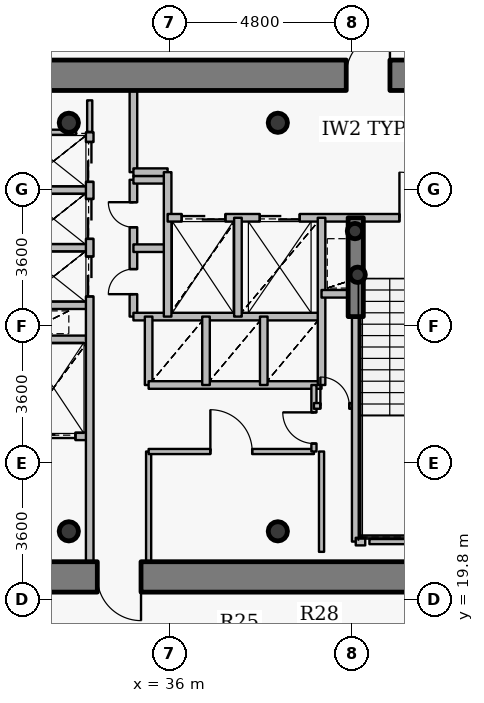
"""IFC4 building model, lengths in metres.
Left out: names, types, materials, properties, quantities, classifications, styles, units other than length and angle.
Written with IfcOpenShell. Run it as: python <this file> out.ifc"""

import sys

from ifc_helpers import new_model, si_unit, direction, frame, frame_2d, origin, origin_2d, place, context, subcontext, project, spatial, rectangle, hollow_circle, extrude, source, transform, mapped, element, fill, save


model = new_model("IFC4")
c1 = context("Model", 3, precision=1e-05, world=origin(), true_north=direction((0.0, 1.0)))
c2 = subcontext(c1, "Body", "Model", "MODEL_VIEW")
j1 = project(units=[si_unit("LENGTHUNIT", "METRE"), si_unit("PLANEANGLEUNIT", "RADIAN")], contexts=[c1])
p1 = place(None, origin())
s1 = spatial("IfcSite", under=j1, at=p1, CompositionType="ELEMENT")
p2 = place(p1, origin())
s2 = spatial("IfcBuilding", under=s1, at=p2, CompositionType="ELEMENT")
p3 = place(p2, frame((0.0, 0.0, 182.4)))
s3 = spatial("IfcBuildingStorey", under=s2, at=p3, CompositionType="ELEMENT", Elevation=182.4)
for number, where, z_axis, x_axis in (
    (1, (33.35, 21.6, 0.0), (0.0, 0.0, 1.0), (1.0, 0.0, 0.0)),
    (2, (38.85, 21.6, 0.0), (0.0, 0.0, 1.0), (1.0, 0.0, 0.0)),
    (3, (38.85, 32.35, 0.0), (0.0, 0.0, 1.0), (1.0, 0.0, 0.0)),
    (4, (33.35, 32.35, 0.0), (0.0, 0.0, 1.0), (1.0, 0.0, 0.0)),
):
    element("IfcColumn", number, at=place(p3, frame(where, z_axis=z_axis, x_axis=x_axis)), inside=s3, PredefinedType="COLUMN", context=c2, shape_type="SweptSolid", body=[
        extrude(hollow_circle(Radius=0.254, WallThickness=0.02, at=origin_2d()), origin(), (0.0, 0.0, 1.0), 3.75),
    ])
for number, where, z_axis, x_axis in (
    (5, (40.95, 28.35, 0.0), (0.0, 0.0, 1.0), (1.0, 0.0, 0.0)),
    (6, (40.88, 29.5, 0.0), (0.0, 0.0, 1.0), (1.0, 0.0, 0.0)),
):
    element("IfcColumn", number, at=place(p3, frame(where, z_axis=z_axis, x_axis=x_axis)), inside=s3, PredefinedType="COLUMN", context=c2, shape_type="SweptSolid", body=[
        extrude(hollow_circle(Radius=0.203, WallThickness=0.016, at=origin_2d()), origin(), (0.0, 0.0, 1.0), 3.75),
    ])
p4 = place(p3, frame((27.2, 33.6, 0.0), z_axis=(0.0, 0.0, 1.0), x_axis=(1.0, 0.0, 0.0)))
e7 = element("IfcWall", 7, at=p4, inside=s3, PredefinedType="SHEAR", context=c2, shape_type="SweptSolid", body=[
    extrude(rectangle(XDim=17.6, YDim=0.8, at=frame_2d((8.8, 0.0))), origin(), (0.0, 0.0, 1.0), 2.95),
])
p5 = place(p4, frame((13.45, 0.0, 0.0)))
e8 = element("IfcOpeningElement", 8, at=p5, cuts=e7, PredefinedType="OPENING", context=c2, shape_type="SweptSolid", body=[
    extrude(rectangle(XDim=1.15, YDim=2.15, at=origin_2d()), frame((0.575, 0.41, 1.075), z_axis=(0.0, -1.0, 0.0), x_axis=(1.0, 0.0, 0.0)), (0.0, 0.0, 1.0), 0.82),
])
p6 = place(p3, frame((44.8, 20.4, 0.0), z_axis=(0.0, 0.0, 1.0), x_axis=(-1.0, 0.0, 0.0)))
e9 = element("IfcWall", 9, at=p6, inside=s3, PredefinedType="SHEAR", context=c2, shape_type="SweptSolid", body=[
    extrude(rectangle(XDim=17.6, YDim=0.8, at=frame_2d((8.8, 0.0))), origin(), (0.0, 0.0, 1.0), 2.95),
])
p7 = place(p6, frame((9.55, 0.0, 0.0)))
e10 = element("IfcOpeningElement", 10, at=p7, cuts=e9, PredefinedType="OPENING", context=c2, shape_type="SweptSolid", body=[
    extrude(rectangle(XDim=1.15, YDim=2.15, at=origin_2d()), frame((0.575, 0.41, 1.075), z_axis=(0.0, -1.0, 0.0), x_axis=(1.0, 0.0, 0.0)), (0.0, 0.0, 1.0), 0.82),
])
p8 = place(p3, frame((40.9, 27.25, 0.0), z_axis=(0.0, 0.0, 1.0), x_axis=(0.0, 1.0, 0.0)))
e11 = element("IfcWall", 11, at=p8, inside=s3, PredefinedType="SHEAR", context=c2, shape_type="SweptSolid", body=[
    extrude(rectangle(XDim=2.6, YDim=0.4, at=frame_2d((1.3, 0.0))), origin(), (0.0, 0.0, 1.0), 3.1),
])
p9 = place(p3, frame((32.0, 24.1, 0.0), z_axis=(0.0, 0.0, 1.0), x_axis=(1.0, 0.0, 0.0)))
e12 = element("IfcWall", 12, at=p9, inside=s3, PredefinedType="PARTITIONING", context=c2, shape_type="SweptSolid", body=[
    extrude(rectangle(XDim=1.9, YDim=0.2, at=frame_2d((0.95, 0.0))), origin(), (0.0, 0.0, 1.0), 3.085),
])
p10 = place(p9, frame((0.375, 0.0, 0.0)))
e13 = element("IfcOpeningElement", 13, at=p10, cuts=e12, PredefinedType="OPENING", context=c2, shape_type="SweptSolid", body=[
    extrude(rectangle(XDim=1.15, YDim=2.15, at=origin_2d()), frame((0.575, 0.11, 1.075), z_axis=(0.0, -1.0, 0.0), x_axis=(1.0, 0.0, 0.0)), (0.0, 0.0, 1.0), 0.22),
])
for number, where, z_axis, x_axis in (
    (14, (32.0, 26.65, 0.0), (0.0, 0.0, 1.0), (1.0, 0.0, 0.0)),
    (15, (32.0, 27.55, 0.0), (0.0, 0.0, 1.0), (1.0, 0.0, 0.0)),
    (16, (32.0, 29.06, 0.0), (0.0, 0.0, 1.0), (1.0, 0.0, 0.0)),
    (17, (32.0, 30.58, 0.0), (0.0, 0.0, 1.0), (1.0, 0.0, 0.0)),
):
    element("IfcWall", number, at=place(p3, frame(where, z_axis=z_axis, x_axis=x_axis)), inside=s3, PredefinedType="PARTITIONING", context=c2, shape_type="SweptSolid", body=[
        extrude(rectangle(XDim=1.9, YDim=0.2, at=frame_2d((0.95, 0.0))), origin(), (0.0, 0.0, 1.0), 3.085),
    ])
p11 = place(p3, frame((33.9, 20.8, 0.0), z_axis=(0.0, 0.0, 1.0), x_axis=(0.0, 1.0, 0.0)))
e18 = element("IfcWall", 18, at=p11, inside=s3, PredefinedType="PARTITIONING", context=c2, shape_type="SweptSolid", body=[
    extrude(rectangle(XDim=11.3, YDim=0.2, at=frame_2d((5.65, 0.0))), origin(), (0.0, 0.0, 1.0), 3.085),
])
p12 = place(p11, frame((6.98, 0.0, 0.0)))
e19 = element("IfcOpeningElement", 19, at=p12, cuts=e18, PredefinedType="OPENING", context=c2, shape_type="SweptSolid", body=[
    extrude(rectangle(XDim=1.05, YDim=2.15, at=origin_2d()), frame((0.525, 0.11, 1.075), z_axis=(0.0, -1.0, 0.0), x_axis=(1.0, 0.0, 0.0)), (0.0, 0.0, 1.0), 0.22),
])
p13 = place(p11, frame((8.495, 0.0, 0.0)))
e20 = element("IfcOpeningElement", 20, at=p13, cuts=e18, PredefinedType="OPENING", context=c2, shape_type="SweptSolid", body=[
    extrude(rectangle(XDim=1.05, YDim=2.15, at=origin_2d()), frame((0.525, 0.11, 1.075), z_axis=(0.0, -1.0, 0.0), x_axis=(1.0, 0.0, 0.0)), (0.0, 0.0, 1.0), 0.22),
])
p14 = place(p11, frame((9.995, 0.0, 0.0)))
e21 = element("IfcOpeningElement", 21, at=p14, cuts=e18, PredefinedType="OPENING", context=c2, shape_type="SweptSolid", body=[
    extrude(rectangle(XDim=1.05, YDim=2.15, at=origin_2d()), frame((0.525, 0.11, 1.075), z_axis=(0.0, -1.0, 0.0), x_axis=(1.0, 0.0, 0.0)), (0.0, 0.0, 1.0), 0.22),
])
p15 = place(p3, frame((35.05, 27.25, 0.0), z_axis=(0.0, 0.0, 1.0), x_axis=(0.0, 1.0, 0.0)))
e22 = element("IfcWall", 22, at=p15, inside=s3, PredefinedType="PARTITIONING", context=c2, shape_type="SweptSolid", body=[
    extrude(rectangle(XDim=3.6, YDim=0.2, at=frame_2d((1.8, 0.0))), origin(), (0.0, 0.0, 1.0), 3.5),
])
p16 = place(p15, frame((0.59, 0.0, 0.0)))
e23 = element("IfcOpeningElement", 23, at=p16, cuts=e22, PredefinedType="OPENING", context=c2, shape_type="SweptSolid", body=[
    extrude(rectangle(XDim=0.66, YDim=2.05, at=origin_2d()), frame((0.33, 0.11, 1.025), z_axis=(0.0, -1.0, 0.0), x_axis=(1.0, 0.0, 0.0)), (0.0, 0.0, 1.0), 0.22),
])
p17 = place(p15, frame((2.35, 0.0, 0.0)))
e24 = element("IfcOpeningElement", 24, at=p17, cuts=e22, PredefinedType="OPENING", context=c2, shape_type="SweptSolid", body=[
    extrude(rectangle(XDim=0.66, YDim=2.05, at=origin_2d()), frame((0.33, 0.11, 1.025), z_axis=(0.0, -1.0, 0.0), x_axis=(1.0, 0.0, 0.0)), (0.0, 0.0, 1.0), 0.22),
])
p18 = place(p3, frame((35.05, 27.25, 0.0), z_axis=(0.0, 0.0, 1.0), x_axis=(1.0, 0.0, 0.0)))
e25 = element("IfcWall", 25, at=p18, inside=s3, PredefinedType="PARTITIONING", context=c2, shape_type="SweptSolid", body=[
    extrude(rectangle(XDim=4.95, YDim=0.2, at=frame_2d((2.475, 0.0))), origin(), (0.0, 0.0, 1.0), 3.085),
])
for number, where, z_axis, x_axis in (
    (26, (35.05, 29.05, 0.0), (0.0, 0.0, 1.0), (1.0, 0.0, 0.0)),
    (27, (35.05, 30.85, 0.0), (0.0, 0.0, 1.0), (1.0, 0.0, 0.0)),
):
    element("IfcWall", number, at=place(p3, frame(where, z_axis=z_axis, x_axis=x_axis)), inside=s3, PredefinedType="PARTITIONING", context=c2, shape_type="SweptSolid", body=[
        extrude(rectangle(XDim=0.9, YDim=0.2, at=frame_2d((0.45, 0.0))), origin(), (0.0, 0.0, 1.0), 3.5),
    ])
p19 = place(p3, frame((35.05, 31.05, 0.0), z_axis=(0.0, 0.0, 1.0), x_axis=(0.0, 1.0, 0.0)))
e28 = element("IfcWall", 28, at=p19, inside=s3, PredefinedType="PARTITIONING", context=c2, shape_type="SweptSolid", body=[
    extrude(rectangle(XDim=2.15, YDim=0.2, at=frame_2d((1.075, 0.0))), origin(), (0.0, 0.0, 1.0), 3.085),
])
p20 = place(p3, frame((35.05, 31.05, 0.0), z_axis=(0.0, 0.0, 1.0), x_axis=(1.0, 0.0, 0.0)))
e29 = element("IfcWall", 29, at=p20, inside=s3, PredefinedType="PARTITIONING", context=c2, shape_type="SweptSolid", body=[
    extrude(rectangle(XDim=0.9, YDim=0.2, at=frame_2d((0.45, 0.0))), origin(), (0.0, 0.0, 1.0), 3.5),
])
p21 = place(p3, frame((35.45, 20.8, 0.0), z_axis=(0.0, 0.0, 1.0), x_axis=(0.0, 1.0, 0.0)))
e30 = element("IfcWall", 30, at=p21, inside=s3, PredefinedType="PARTITIONING", context=c2, shape_type="SweptSolid", body=[
    extrude(rectangle(XDim=2.9, YDim=0.135, at=frame_2d((1.45, 0.0))), origin(), (0.0, 0.0, 1.0), 3.085),
])
p22 = place(p3, frame((35.45, 23.7, 0.0), z_axis=(0.0, 0.0, 1.0), x_axis=(1.0, 0.0, 0.0)))
e31 = element("IfcWall", 31, at=p22, inside=s3, PredefinedType="PARTITIONING", context=c2, shape_type="SweptSolid", body=[
    extrude(rectangle(XDim=4.35, YDim=0.135, at=frame_2d((2.175, 0.0))), origin(), (0.0, 0.0, 1.0), 3.085),
])
p23 = place(p22, frame((1.625, 0.0, 0.0)))
e32 = element("IfcOpeningElement", 32, at=p23, cuts=e31, PredefinedType="OPENING", context=c2, shape_type="SweptSolid", body=[
    extrude(rectangle(XDim=1.1, YDim=2.15, at=origin_2d()), frame((0.55, 0.078, 1.075), z_axis=(0.0, -1.0, 0.0), x_axis=(1.0, 0.0, 0.0)), (0.0, 0.0, 1.0), 0.155),
])
p24 = place(p3, frame((35.45, 25.45, 0.0), z_axis=(0.0, 0.0, 1.0), x_axis=(0.0, 1.0, 0.0)))
e33 = element("IfcWall", 33, at=p24, inside=s3, PredefinedType="PARTITIONING", context=c2, shape_type="SweptSolid", body=[
    extrude(rectangle(XDim=1.8, YDim=0.2, at=frame_2d((0.9, 0.0))), origin(), (0.0, 0.0, 1.0), 3.5),
])
p25 = place(p3, frame((35.45, 25.45, 0.0), z_axis=(0.0, 0.0, 1.0), x_axis=(1.0, 0.0, 0.0)))
e34 = element("IfcWall", 34, at=p25, inside=s3, PredefinedType="PARTITIONING", context=c2, shape_type="SweptSolid", body=[
    extrude(rectangle(XDim=4.55, YDim=0.2, at=frame_2d((2.275, 0.0))), origin(), (0.0, 0.0, 1.0), 3.085),
])
p26 = place(p3, frame((35.95, 27.25, 0.0), z_axis=(0.0, 0.0, 1.0), x_axis=(0.0, 1.0, 0.0)))
e35 = element("IfcWall", 35, at=p26, inside=s3, PredefinedType="PARTITIONING", context=c2, shape_type="SweptSolid", body=[
    extrude(rectangle(XDim=3.8, YDim=0.2, at=frame_2d((1.9, 0.0))), origin(), (0.0, 0.0, 1.0), 3.5),
])
p27 = place(p3, frame((35.95, 29.85, 0.0), z_axis=(0.0, 0.0, 1.0), x_axis=(1.0, 0.0, 0.0)))
e36 = element("IfcWall", 36, at=p27, inside=s3, PredefinedType="PARTITIONING", context=c2, shape_type="SweptSolid", body=[
    extrude(rectangle(XDim=8.49, YDim=0.2, at=frame_2d((4.245, 0.0))), origin(), (0.0, 0.0, 1.0), 3.085),
])
p28 = place(p27, frame((6.1, 0.0, 0.0)))
e37 = element("IfcOpeningElement", 37, at=p28, cuts=e36, PredefinedType="OPENING", context=c2, shape_type="SweptSolid", body=[
    extrude(rectangle(XDim=1.2, YDim=2.15, at=origin_2d()), frame((0.6, 0.11, 1.075), z_axis=(0.0, -1.0, 0.0), x_axis=(1.0, 0.0, 0.0)), (0.0, 0.0, 1.0), 0.22),
])
p29 = place(p27, frame((0.37, 0.0, 0.0)))
e38 = element("IfcOpeningElement", 38, at=p29, cuts=e36, PredefinedType="OPENING", context=c2, shape_type="SweptSolid", body=[
    extrude(rectangle(XDim=1.15, YDim=2.15, at=origin_2d()), frame((0.575, 0.11, 1.075), z_axis=(0.0, -1.0, 0.0), x_axis=(1.0, 0.0, 0.0)), (0.0, 0.0, 1.0), 0.22),
])
p30 = place(p27, frame((2.425, 0.0, 0.0)))
e39 = element("IfcOpeningElement", 39, at=p30, cuts=e36, PredefinedType="OPENING", context=c2, shape_type="SweptSolid", body=[
    extrude(rectangle(XDim=1.05, YDim=2.15, at=origin_2d()), frame((0.525, 0.11, 1.075), z_axis=(0.0, -1.0, 0.0), x_axis=(1.0, 0.0, 0.0)), (0.0, 0.0, 1.0), 0.22),
])
p31 = place(p3, frame((36.96, 25.45, 0.0), z_axis=(0.0, 0.0, 1.0), x_axis=(0.0, 1.0, 0.0)))
e40 = element("IfcWall", 40, at=p31, inside=s3, PredefinedType="PARTITIONING", context=c2, shape_type="SweptSolid", body=[
    extrude(rectangle(XDim=1.8, YDim=0.2, at=frame_2d((0.9, 0.0))), origin(), (0.0, 0.0, 1.0), 3.5),
])
p32 = place(p3, frame((37.8, 27.25, 0.0), z_axis=(0.0, 0.0, 1.0), x_axis=(0.0, 1.0, 0.0)))
e41 = element("IfcWall", 41, at=p32, inside=s3, PredefinedType="PARTITIONING", context=c2, shape_type="SweptSolid", body=[
    extrude(rectangle(XDim=2.6, YDim=0.2, at=frame_2d((1.3, 0.0))), origin(), (0.0, 0.0, 1.0), 3.5),
])
p33 = place(p3, frame((38.48, 25.45, 0.0), z_axis=(0.0, 0.0, 1.0), x_axis=(0.0, 1.0, 0.0)))
e42 = element("IfcWall", 42, at=p33, inside=s3, PredefinedType="PARTITIONING", context=c2, shape_type="SweptSolid", body=[
    extrude(rectangle(XDim=1.8, YDim=0.2, at=frame_2d((0.9, 0.0))), origin(), (0.0, 0.0, 1.0), 3.5),
])
p34 = place(p3, frame((39.8, 23.7, 0.0), z_axis=(0.0, 0.0, 1.0), x_axis=(0.0, 1.0, 0.0)))
e43 = element("IfcWall", 43, at=p34, inside=s3, PredefinedType="PARTITIONING", context=c2, shape_type="SweptSolid", body=[
    extrude(rectangle(XDim=1.75, YDim=0.135, at=frame_2d((0.875, 0.0))), origin(), (0.0, 0.0, 1.0), 3.5),
])
p35 = place(p34, frame((0.21, 0.0, 0.0)))
e44 = element("IfcOpeningElement", 44, at=p35, cuts=e43, PredefinedType="OPENING", context=c2, shape_type="SweptSolid", body=[
    extrude(rectangle(XDim=0.82, YDim=2.1, at=origin_2d()), frame((0.41, 0.078, 1.05), z_axis=(0.0, -1.0, 0.0), x_axis=(1.0, 0.0, 0.0)), (0.0, 0.0, 1.0), 0.155),
])
p36 = place(p3, frame((39.8, 24.9, 0.0), z_axis=(0.0, 0.0, 1.0), x_axis=(1.0, 0.0, 0.0)))
e45 = element("IfcWall", 45, at=p36, inside=s3, PredefinedType="PARTITIONING", context=c2, shape_type="SweptSolid", body=[
    extrude(rectangle(XDim=1.1, YDim=0.15, at=frame_2d((0.55, 0.0))), origin(), (0.0, 0.0, 1.0), 3.5),
])
p37 = place(p36, frame((0.17, 0.0, 0.0)))
e46 = element("IfcOpeningElement", 46, at=p37, cuts=e45, PredefinedType="OPENING", context=c2, shape_type="SweptSolid", body=[
    extrude(rectangle(XDim=0.76, YDim=2.1, at=origin_2d()), frame((0.38, 0.085, 1.05), z_axis=(0.0, -1.0, 0.0), x_axis=(1.0, 0.0, 0.0)), (0.0, 0.0, 1.0), 0.17),
])
p38 = place(p3, frame((40.0, 25.45, 0.0), z_axis=(0.0, 0.0, 1.0), x_axis=(0.0, 1.0, 0.0)))
e47 = element("IfcWall", 47, at=p38, inside=s3, PredefinedType="PARTITIONING", context=c2, shape_type="SweptSolid", body=[
    extrude(rectangle(XDim=4.4, YDim=0.2, at=frame_2d((2.2, 0.0))), origin(), (0.0, 0.0, 1.0), 3.5),
])
p39 = place(p3, frame((40.0, 27.85, 0.0), z_axis=(0.0, 0.0, 1.0), x_axis=(1.0, 0.0, 0.0)))
e48 = element("IfcWall", 48, at=p39, inside=s3, PredefinedType="PARTITIONING", context=c2, shape_type="SweptSolid", body=[
    extrude(rectangle(XDim=0.9, YDim=0.2, at=frame_2d((0.45, 0.0))), origin(), (0.0, 0.0, 1.0), 3.5),
])
p40 = place(p3, frame((40.9, 21.33, 0.0), z_axis=(0.0, 0.0, 1.0), x_axis=(0.0, 1.0, 0.0)))
e49 = element("IfcWall", 49, at=p40, inside=s3, PredefinedType="PARTITIONING", context=c2, shape_type="SweptSolid", body=[
    extrude(rectangle(XDim=5.91, YDim=0.2, at=frame_2d((2.955, 0.0))), origin(), (0.0, 0.0, 1.0), 3.035),
])
p41 = place(p3, frame((40.9, 21.33, 0.0), z_axis=(0.0, 0.0, 1.0), x_axis=(1.0, 0.0, 0.0)))
e50 = element("IfcWall", 50, at=p41, inside=s3, PredefinedType="PARTITIONING", context=c2, shape_type="SweptSolid", body=[
    extrude(rectangle(XDim=0.25, YDim=0.2, at=frame_2d((0.125, 0.0))), origin(), (0.0, 0.0, 1.0), 3.035),
])
p42 = place(p3, frame((44.08, 21.33, 0.0), z_axis=(0.0, 0.0, 1.0), x_axis=(-1.0, 0.0, 0.0)))
e51 = element("IfcWall", 51, at=p42, inside=s3, PredefinedType="PARTITIONING", context=c2, shape_type="SweptSolid", body=[
    extrude(rectangle(XDim=2.82, YDim=0.135, at=frame_2d((1.41, 0.0))), origin(), (0.0, 0.0, 1.0), 3.035),
])
p43 = place(p3, frame((32.36, 32.1, 0.0), z_axis=(0.0, 0.0, 1.0), x_axis=(1.0, 0.0, 0.0)))
e52 = element("IfcWall", 52, at=p43, inside=s3, PredefinedType="PARTITIONING", context=c2, shape_type="SweptSolid", body=[
    extrude(rectangle(XDim=1.18, YDim=0.135, at=frame_2d((0.59, 0.0))), origin(), (0.0, 0.0, 1.0), 3.085),
])
p44 = place(p3, frame((40.0, 23.7, 0.0), z_axis=(0.0, 0.0, 1.0), x_axis=(0.0, -1.0, 0.0)))
e53 = element("IfcWall", 53, at=p44, inside=s3, PredefinedType="PARTITIONING", context=c2, shape_type="SweptSolid", body=[
    extrude(rectangle(XDim=2.64, YDim=0.135, at=frame_2d((1.32, 0.0))), origin(), (0.0, 0.0, 1.0), 3.035),
])
p45 = place(p3, frame((33.9, 32.11, 0.0), z_axis=(0.0, 0.0, 1.0), x_axis=(0.0, 1.0, 0.0)))
e54 = element("IfcWall", 54, at=p45, inside=s3, PredefinedType="PARTITIONING", context=c2, shape_type="SweptSolid", body=[
    extrude(rectangle(XDim=0.83, YDim=0.135, at=frame_2d((0.415, 0.0))), origin(), (0.0, 0.0, 1.0), 3.085),
])
m1 = source(origin(), c2, "Body", "SweptSolid", [
    extrude(rectangle(XDim=1.15, YDim=2.15, at=origin_2d()), frame((0.575, 0.025, 1.075), z_axis=(0.0, -1.0, 0.0), x_axis=(1.0, 0.0, 0.0)), (0.0, 0.0, 1.0), 0.05),
])
p46 = place(p5, origin())
e55 = element("IfcDoor", 55, at=p46, inside=s3, OperationType="SINGLE_SWING_RIGHT", PredefinedType="DOOR", context=c2, shape_type="MappedRepresentation", body=[
    mapped(m1, transform((0.0, 0.0, 0.0), x_axis=(1.0, 0.0, 0.0), y_axis=(0.0, 1.0, 0.0), z_axis=(0.0, 0.0, 1.0), scale=1.0)),
])
fill(e8, e55)
p47 = place(p7, origin())
e56 = element("IfcDoor", 56, at=p47, inside=s3, OperationType="SINGLE_SWING_LEFT", PredefinedType="DOOR", context=c2, shape_type="MappedRepresentation", body=[
    mapped(m1, transform((0.0, 0.0, 0.0), x_axis=(1.0, 0.0, 0.0), y_axis=(0.0, 1.0, 0.0), z_axis=(0.0, 0.0, 1.0), scale=1.0)),
])
fill(e10, e56)
m2 = source(origin(), c2, "Body", "SweptSolid", [
    extrude(rectangle(XDim=1.2, YDim=2.15, at=origin_2d()), frame((0.6, 0.025, 1.075), z_axis=(0.0, -1.0, 0.0), x_axis=(1.0, 0.0, 0.0)), (0.0, 0.0, 1.0), 0.05),
])
p48 = place(p28, origin())
e57 = element("IfcDoor", 57, at=p48, inside=s3, OperationType="SINGLE_SWING_LEFT", PredefinedType="DOOR", context=c2, shape_type="MappedRepresentation", body=[
    mapped(m2, transform((0.0, 0.0, 0.0), x_axis=(1.0, 0.0, 0.0), y_axis=(0.0, 1.0, 0.0), z_axis=(0.0, 0.0, 1.0), scale=1.0)),
])
fill(e37, e57)
m3 = source(origin(), c2, "Body", "SweptSolid", [
    extrude(rectangle(XDim=1.15, YDim=2.15, at=origin_2d()), frame((0.575, 0.025, 1.075), z_axis=(0.0, -1.0, 0.0), x_axis=(1.0, 0.0, 0.0)), (0.0, 0.0, 1.0), 0.05),
])
p49 = place(p29, origin())
e58 = element("IfcDoor", 58, at=p49, inside=s3, OperationType="DOUBLE_DOOR_SLIDING", PredefinedType="USERDEFINED", context=c2, shape_type="MappedRepresentation", body=[
    mapped(m3, transform((0.0, 0.0, 0.0), x_axis=(1.0, 0.0, 0.0), y_axis=(0.0, 1.0, 0.0), z_axis=(0.0, 0.0, 1.0), scale=1.0)),
])
fill(e38, e58)
p50 = place(p10, origin())
e59 = element("IfcDoor", 59, at=p50, inside=s3, OperationType="DOUBLE_DOOR_SLIDING", PredefinedType="USERDEFINED", context=c2, shape_type="MappedRepresentation", body=[
    mapped(m3, transform((0.0, 0.0, 0.0), x_axis=(1.0, 0.0, 0.0), y_axis=(0.0, 1.0, 0.0), z_axis=(0.0, 0.0, 1.0), scale=1.0)),
])
fill(e13, e59)
m4 = source(origin(), c2, "Body", "SweptSolid", [
    extrude(rectangle(XDim=1.05, YDim=2.15, at=origin_2d()), frame((0.525, 0.025, 1.075), z_axis=(0.0, -1.0, 0.0), x_axis=(1.0, 0.0, 0.0)), (0.0, 0.0, 1.0), 0.05),
])
p51 = place(p30, origin())
e60 = element("IfcDoor", 60, at=p51, inside=s3, OperationType="DOUBLE_DOOR_SLIDING", PredefinedType="USERDEFINED", context=c2, shape_type="MappedRepresentation", body=[
    mapped(m4, transform((0.0, 0.0, 0.0), x_axis=(1.0, 0.0, 0.0), y_axis=(0.0, 1.0, 0.0), z_axis=(0.0, 0.0, 1.0), scale=1.0)),
])
fill(e39, e60)
p52 = place(p12, origin())
e61 = element("IfcDoor", 61, at=p52, inside=s3, OperationType="DOUBLE_DOOR_SLIDING", PredefinedType="USERDEFINED", context=c2, shape_type="MappedRepresentation", body=[
    mapped(m4, transform((0.0, 0.0, 0.0), x_axis=(1.0, 0.0, 0.0), y_axis=(0.0, 1.0, 0.0), z_axis=(0.0, 0.0, 1.0), scale=1.0)),
])
fill(e19, e61)
p53 = place(p13, origin())
e62 = element("IfcDoor", 62, at=p53, inside=s3, OperationType="DOUBLE_DOOR_SLIDING", PredefinedType="USERDEFINED", context=c2, shape_type="MappedRepresentation", body=[
    mapped(m4, transform((0.0, 0.0, 0.0), x_axis=(1.0, 0.0, 0.0), y_axis=(0.0, 1.0, 0.0), z_axis=(0.0, 0.0, 1.0), scale=1.0)),
])
fill(e20, e62)
p54 = place(p14, origin())
e63 = element("IfcDoor", 63, at=p54, inside=s3, OperationType="DOUBLE_DOOR_SLIDING", PredefinedType="USERDEFINED", context=c2, shape_type="MappedRepresentation", body=[
    mapped(m4, transform((0.0, 0.0, 0.0), x_axis=(1.0, 0.0, 0.0), y_axis=(0.0, 1.0, 0.0), z_axis=(0.0, 0.0, 1.0), scale=1.0)),
])
fill(e21, e63)
m5 = source(origin(), c2, "Body", "SweptSolid", [
    extrude(rectangle(XDim=0.66, YDim=2.05, at=origin_2d()), frame((0.33, 0.025, 1.025), z_axis=(0.0, -1.0, 0.0), x_axis=(1.0, 0.0, 0.0)), (0.0, 0.0, 1.0), 0.05),
])
p55 = place(p16, origin())
e64 = element("IfcDoor", 64, at=p55, inside=s3, OperationType="SINGLE_SWING_LEFT", PredefinedType="USERDEFINED", context=c2, shape_type="MappedRepresentation", body=[
    mapped(m5, transform((0.0, 0.0, 0.0), x_axis=(1.0, 0.0, 0.0), y_axis=(0.0, 1.0, 0.0), z_axis=(0.0, 0.0, 1.0), scale=1.0)),
])
fill(e23, e64)
p56 = place(p17, origin())
e65 = element("IfcDoor", 65, at=p56, inside=s3, OperationType="SINGLE_SWING_RIGHT", PredefinedType="USERDEFINED", context=c2, shape_type="MappedRepresentation", body=[
    mapped(m5, transform((0.0, 0.0, 0.0), x_axis=(1.0, 0.0, 0.0), y_axis=(0.0, 1.0, 0.0), z_axis=(0.0, 0.0, 1.0), scale=1.0)),
])
fill(e24, e65)
m6 = source(origin(), c2, "Body", "SweptSolid", [
    extrude(rectangle(XDim=1.1, YDim=2.15, at=origin_2d()), frame((0.55, 0.025, 1.075), z_axis=(0.0, -1.0, 0.0), x_axis=(1.0, 0.0, 0.0)), (0.0, 0.0, 1.0), 0.05),
])
p57 = place(p23, origin())
e66 = element("IfcDoor", 66, at=p57, inside=s3, OperationType="SINGLE_SWING_LEFT", PredefinedType="DOOR", context=c2, shape_type="MappedRepresentation", body=[
    mapped(m6, transform((0.0, 0.0, 0.0), x_axis=(1.0, 0.0, 0.0), y_axis=(0.0, 1.0, 0.0), z_axis=(0.0, 0.0, 1.0), scale=1.0)),
])
fill(e32, e66)
m7 = source(origin(), c2, "Body", "SweptSolid", [
    extrude(rectangle(XDim=0.82, YDim=2.1, at=origin_2d()), frame((0.41, 0.025, 1.05), z_axis=(0.0, -1.0, 0.0), x_axis=(1.0, 0.0, 0.0)), (0.0, 0.0, 1.0), 0.05),
])
p58 = place(p35, origin())
e67 = element("IfcDoor", 67, at=p58, inside=s3, OperationType="SINGLE_SWING_RIGHT", PredefinedType="DOOR", context=c2, shape_type="MappedRepresentation", body=[
    mapped(m7, transform((0.0, 0.0, 0.0), x_axis=(1.0, 0.0, 0.0), y_axis=(0.0, 1.0, 0.0), z_axis=(0.0, 0.0, 1.0), scale=1.0)),
])
fill(e44, e67)
m8 = source(origin(), c2, "Body", "SweptSolid", [
    extrude(rectangle(XDim=0.76, YDim=2.1, at=origin_2d()), frame((0.38, 0.025, 1.05), z_axis=(0.0, -1.0, 0.0), x_axis=(1.0, 0.0, 0.0)), (0.0, 0.0, 1.0), 0.05),
])
p59 = place(p37, origin())
e68 = element("IfcDoor", 68, at=p59, inside=s3, OperationType="SINGLE_SWING_LEFT", PredefinedType="DOOR", context=c2, shape_type="MappedRepresentation", body=[
    mapped(m8, transform((0.0, 0.0, 0.0), x_axis=(1.0, 0.0, 0.0), y_axis=(0.0, 1.0, 0.0), z_axis=(0.0, 0.0, 1.0), scale=1.0)),
])
fill(e46, e68)
save(model, sys.argv[1])
